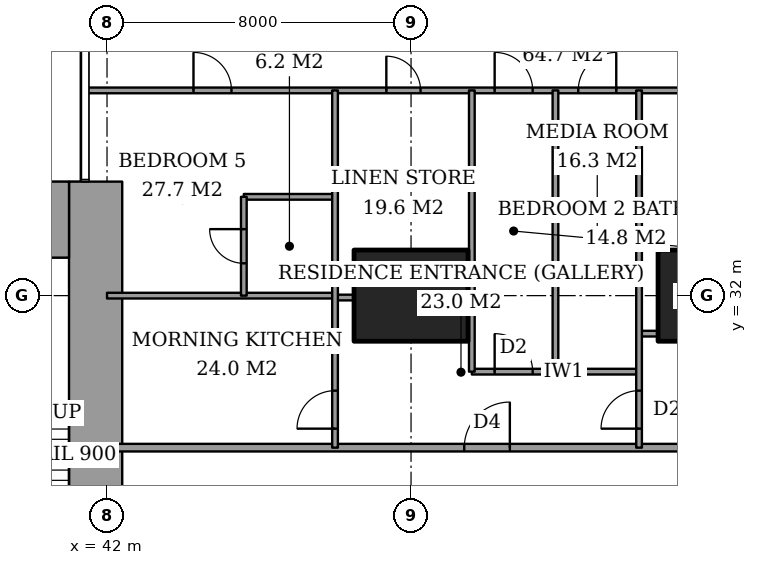
"""IFC4 building model, lengths in metres.
Left out: names, types, materials, properties, quantities, classifications, styles, units other than length and angle.
Written with IfcOpenShell. Run it as: python <this file> out.ifc"""

import sys

from ifc_helpers import new_model, si_unit, direction, frame, frame_2d, origin, origin_2d, place, context, subcontext, project, spatial, rectangle, extrude, element, fill, save


model = new_model("IFC4")
c1 = context("Model", 3, precision=1e-05, world=origin(), true_north=direction((0.0, 1.0)))
c2 = subcontext(c1, "Body", "Model", "MODEL_VIEW")
j1 = project(units=[si_unit("LENGTHUNIT", "METRE"), si_unit("PLANEANGLEUNIT", "RADIAN")], contexts=[c1])
p1 = place(None, origin())
s1 = spatial("IfcSite", under=j1, at=p1, CompositionType="ELEMENT")
p2 = place(p1, origin())
s2 = spatial("IfcBuilding", under=s1, at=p2, CompositionType="ELEMENT")
p3 = place(p2, frame((0.0, 0.0, 189.4)))
s3 = spatial("IfcBuildingStorey", under=s2, at=p3, CompositionType="ELEMENT", Elevation=189.4)
for number, where, z_axis, x_axis in (
    (1, (50.0, 32.0, 0.0), (0.0, 0.0, 1.0), (1.0, 0.0, 0.0)),
    (2, (58.0, 32.0, 0.0), (0.0, 0.0, 1.0), (1.0, 0.0, 0.0)),
):
    element("IfcColumn", number, at=place(p3, frame(where, z_axis=z_axis, x_axis=x_axis)), inside=s3, PredefinedType="COLUMN", context=c2, shape_type="SweptSolid", body=[
        extrude(rectangle(XDim=3.0, YDim=2.4, at=origin_2d()), origin(), (0.0, 0.0, 1.0), 3.6),
    ])
p4 = place(p3, frame((37.85, 34.0, 0.0), z_axis=(0.0, 0.0, 1.0), x_axis=(1.0, 0.0, 0.0)))
e3 = element("IfcWall", 3, at=p4, inside=s3, PredefinedType="SHEAR", context=c2, shape_type="SweptSolid", body=[
    extrude(rectangle(XDim=3.15, YDim=2.0, at=frame_2d((1.575, 0.0))), origin(), (0.0, 0.0, 1.0), 3.6),
])
p5 = place(p3, frame((41.7, 24.85, 0.0), z_axis=(0.0, 0.0, 1.0), x_axis=(0.0, 1.0, 0.0)))
e4 = element("IfcWall", 4, at=p5, inside=s3, PredefinedType="SHEAR", context=c2, shape_type="SweptSolid", body=[
    extrude(rectangle(XDim=10.15, YDim=1.4, at=frame_2d((5.075, 0.0))), origin(), (0.0, 0.0, 1.0), 3.6),
])
p6 = place(p3, frame((42.0, 28.0, 0.0), z_axis=(0.0, 0.0, 1.0), x_axis=(1.0, 0.0, 0.0)))
e5 = element("IfcWall", 5, at=p6, inside=s3, PredefinedType="PARTITIONING", context=c2, shape_type="SweptSolid", body=[
    extrude(rectangle(XDim=17.275, YDim=0.2, at=frame_2d((8.637, 0.0))), origin(), (0.0, 0.0, 1.0), 3.35),
])
p7 = place(p6, frame((9.4, 0.0, 0.0)))
e6 = element("IfcOpeningElement", 6, at=p7, cuts=e5, PredefinedType="OPENING", context=c2, shape_type="SweptSolid", body=[
    extrude(rectangle(XDim=1.2, YDim=2.4, at=frame_2d((0.6, 1.2))), frame((0.0, 0.11, 0.0), z_axis=(0.0, -1.0, 0.0), x_axis=(1.0, 0.0, 0.0)), (0.0, 0.0, 1.0), 0.22),
])
p8 = place(p3, frame((51.6, 30.0, 0.0), z_axis=(0.0, 0.0, 1.0), x_axis=(1.0, 0.0, 0.0)))
e7 = element("IfcWall", 7, at=p8, inside=s3, PredefinedType="PARTITIONING", context=c2, shape_type="SweptSolid", body=[
    extrude(rectangle(XDim=4.4, YDim=0.15, at=frame_2d((2.2, 0.0))), origin(), (0.0, 0.0, 1.0), 3.35),
])
p9 = place(p8, frame((0.6, 0.0, 0.0)))
e8 = element("IfcOpeningElement", 8, at=p9, cuts=e7, PredefinedType="OPENING", context=c2, shape_type="SweptSolid", body=[
    extrude(rectangle(XDim=1.0, YDim=2.1, at=frame_2d((0.5, 1.05))), frame((0.0, 0.085, 0.0), z_axis=(0.0, -1.0, 0.0), x_axis=(1.0, 0.0, 0.0)), (0.0, 0.0, 1.0), 0.17),
])
p10 = place(p3, frame((56.0, 31.0, 0.0), z_axis=(0.0, 0.0, 1.0), x_axis=(1.0, 0.0, 0.0)))
e9 = element("IfcWall", 9, at=p10, inside=s3, PredefinedType="PARTITIONING", context=c2, shape_type="SweptSolid", body=[
    extrude(rectangle(XDim=0.5, YDim=0.15, at=frame_2d((0.25, 0.0))), origin(), (0.0, 0.0, 1.0), 3.35),
])
p11 = place(p3, frame((48.0, 31.95, 0.0), z_axis=(0.0, 0.0, 1.0), x_axis=(1.0, 0.0, 0.0)))
e10 = element("IfcWall", 10, at=p11, inside=s3, PredefinedType="PARTITIONING", context=c2, shape_type="SweptSolid", body=[
    extrude(rectangle(XDim=0.5, YDim=0.15, at=frame_2d((0.25, 0.0))), origin(), (0.0, 0.0, 1.0), 2.634),
])
p12 = place(p3, frame((42.0, 32.0, 0.0), z_axis=(0.0, 0.0, 1.0), x_axis=(1.0, 0.0, 0.0)))
e11 = element("IfcWall", 11, at=p12, inside=s3, PredefinedType="PARTITIONING", context=c2, shape_type="SweptSolid", body=[
    extrude(rectangle(XDim=6.0, YDim=0.15, at=frame_2d((3.0, 0.0))), origin(), (0.0, 0.0, 1.0), 2.634),
])
p13 = place(p3, frame((45.6, 34.6, 0.0), z_axis=(0.0, 0.0, 1.0), x_axis=(1.0, 0.0, 0.0)))
e12 = element("IfcWall", 12, at=p13, inside=s3, PredefinedType="PARTITIONING", context=c2, shape_type="SweptSolid", body=[
    extrude(rectangle(XDim=2.4, YDim=0.15, at=frame_2d((1.2, 0.0))), origin(), (0.0, 0.0, 1.0), 3.35),
])
p14 = place(p3, frame((41.439, 37.4, 0.0), z_axis=(0.0, 0.0, 1.0), x_axis=(1.0, 0.0, 0.0)))
e13 = element("IfcWall", 13, at=p14, inside=s3, PredefinedType="PARTITIONING", context=c2, shape_type="SweptSolid", body=[
    extrude(rectangle(XDim=25.011, YDim=0.15, at=frame_2d((12.505, 0.0))), origin(), (0.0, 0.0, 1.0), 3.35),
])
p15 = place(p14, frame((10.761, 0.0, 0.0)))
e14 = element("IfcOpeningElement", 14, at=p15, cuts=e13, PredefinedType="OPENING", context=c2, shape_type="SweptSolid", body=[
    extrude(rectangle(XDim=1.0, YDim=2.1, at=frame_2d((0.5, 1.05))), frame((0.0, 0.085, 0.0), z_axis=(0.0, -1.0, 0.0), x_axis=(1.0, 0.0, 0.0)), (0.0, 0.0, 1.0), 0.17),
])
p16 = place(p14, frame((20.924, 0.0, 0.0)))
e15 = element("IfcOpeningElement", 15, at=p16, cuts=e13, PredefinedType="OPENING", context=c2, shape_type="SweptSolid", body=[
    extrude(rectangle(XDim=1.0, YDim=2.1, at=frame_2d((0.5, 1.05))), frame((0.0, 0.085, 0.0), z_axis=(0.0, -1.0, 0.0), x_axis=(1.0, 0.0, 0.0)), (0.0, 0.0, 1.0), 0.17),
])
p17 = place(p14, frame((15.749, 0.0, 0.0)))
e16 = element("IfcOpeningElement", 16, at=p17, cuts=e13, PredefinedType="OPENING", context=c2, shape_type="SweptSolid", body=[
    extrude(rectangle(XDim=0.9, YDim=2.1, at=frame_2d((0.45, 1.05))), frame((0.0, 0.085, 0.0), z_axis=(0.0, -1.0, 0.0), x_axis=(1.0, 0.0, 0.0)), (0.0, 0.0, 1.0), 0.17),
])
p18 = place(p14, frame((12.961, 0.0, 0.0)))
e17 = element("IfcOpeningElement", 17, at=p18, cuts=e13, PredefinedType="OPENING", context=c2, shape_type="SweptSolid", body=[
    extrude(rectangle(XDim=1.0, YDim=2.1, at=frame_2d((0.5, 1.05))), frame((0.0, 0.085, 0.0), z_axis=(0.0, -1.0, 0.0), x_axis=(1.0, 0.0, 0.0)), (0.0, 0.0, 1.0), 0.17),
])
p19 = place(p14, frame((7.911, 0.0, 0.0)))
e18 = element("IfcOpeningElement", 18, at=p19, cuts=e13, PredefinedType="OPENING", context=c2, shape_type="SweptSolid", body=[
    extrude(rectangle(XDim=0.9, YDim=2.1, at=frame_2d((0.45, 1.05))), frame((0.0, 0.085, 0.0), z_axis=(0.0, -1.0, 0.0), x_axis=(1.0, 0.0, 0.0)), (0.0, 0.0, 1.0), 0.17),
])
p20 = place(p14, frame((2.836, 0.0, 0.0)))
e19 = element("IfcOpeningElement", 19, at=p20, cuts=e13, PredefinedType="OPENING", context=c2, shape_type="SweptSolid", body=[
    extrude(rectangle(XDim=1.0, YDim=2.1, at=frame_2d((0.5, 1.05))), frame((0.0, 0.085, 0.0), z_axis=(0.0, -1.0, 0.0), x_axis=(1.0, 0.0, 0.0)), (0.0, 0.0, 1.0), 0.17),
])
p21 = place(p3, frame((45.6, 32.0, 0.0), z_axis=(0.0, 0.0, 1.0), x_axis=(0.0, 1.0, 0.0)))
e20 = element("IfcWall", 20, at=p21, inside=s3, PredefinedType="PARTITIONING", context=c2, shape_type="SweptSolid", body=[
    extrude(rectangle(XDim=2.6, YDim=0.15, at=frame_2d((1.3, 0.0))), origin(), (0.0, 0.0, 1.0), 3.35),
])
p22 = place(p21, frame((0.85, 0.0, 0.0)))
e21 = element("IfcOpeningElement", 21, at=p22, cuts=e20, PredefinedType="OPENING", context=c2, shape_type="SweptSolid", body=[
    extrude(rectangle(XDim=0.9, YDim=2.1, at=frame_2d((0.45, 1.05))), frame((0.0, 0.085, 0.0), z_axis=(0.0, -1.0, 0.0), x_axis=(1.0, 0.0, 0.0)), (0.0, 0.0, 1.0), 0.17),
])
p23 = place(p3, frame((48.0, 28.0, 0.0), z_axis=(0.0, 0.0, 1.0), x_axis=(0.0, 1.0, 0.0)))
e22 = element("IfcWall", 22, at=p23, inside=s3, PredefinedType="PARTITIONING", context=c2, shape_type="SweptSolid", body=[
    extrude(rectangle(XDim=9.4, YDim=0.15, at=frame_2d((4.7, 0.0))), origin(), (0.0, 0.0, 1.0), 3.35),
])
p24 = place(p23, frame((0.5, 0.0, 0.0)))
e23 = element("IfcOpeningElement", 23, at=p24, cuts=e22, PredefinedType="OPENING", context=c2, shape_type="SweptSolid", body=[
    extrude(rectangle(XDim=1.0, YDim=2.1, at=frame_2d((0.5, 1.05))), frame((0.0, 0.085, 0.0), z_axis=(0.0, -1.0, 0.0), x_axis=(1.0, 0.0, 0.0)), (0.0, 0.0, 1.0), 0.17),
])
for number, where, z_axis, x_axis in (
    (24, (51.6, 30.0, 0.0), (0.0, 0.0, 1.0), (0.0, 1.0, 0.0)),
    (25, (53.8, 30.0, 0.0), (0.0, 0.0, 1.0), (0.0, 1.0, 0.0)),
):
    element("IfcWall", number, at=place(p3, frame(where, z_axis=z_axis, x_axis=x_axis)), inside=s3, PredefinedType="PARTITIONING", context=c2, shape_type="SweptSolid", body=[
        extrude(rectangle(XDim=7.4, YDim=0.15, at=frame_2d((3.7, 0.0))), origin(), (0.0, 0.0, 1.0), 3.35),
    ])
p25 = place(p3, frame((56.0, 28.0, 0.0), z_axis=(0.0, 0.0, 1.0), x_axis=(0.0, 1.0, 0.0)))
e26 = element("IfcWall", 26, at=p25, inside=s3, PredefinedType="PARTITIONING", context=c2, shape_type="SweptSolid", body=[
    extrude(rectangle(XDim=9.4, YDim=0.15, at=frame_2d((4.7, 0.0))), origin(), (0.0, 0.0, 1.0), 3.35),
])
p26 = place(p25, frame((0.5, 0.0, 0.0)))
e27 = element("IfcOpeningElement", 27, at=p26, cuts=e26, PredefinedType="OPENING", context=c2, shape_type="SweptSolid", body=[
    extrude(rectangle(XDim=1.0, YDim=2.1, at=frame_2d((0.5, 1.05))), frame((0.0, 0.085, 0.0), z_axis=(0.0, -1.0, 0.0), x_axis=(1.0, 0.0, 0.0)), (0.0, 0.0, 1.0), 0.17),
])
p27 = place(p15, origin())
e28 = element("IfcDoor", 28, at=p27, inside=s3, OperationType="SINGLE_SWING_RIGHT", PredefinedType="DOOR", context=c2, shape_type="SweptSolid", body=[
    extrude(rectangle(XDim=1.0, YDim=2.1, at=frame_2d((0.5, 1.05))), frame((0.0, 0.025, 0.0), z_axis=(0.0, -1.0, 0.0), x_axis=(1.0, 0.0, 0.0)), (0.0, 0.0, 1.0), 0.05),
])
fill(e14, e28)
p28 = place(p26, origin())
e29 = element("IfcDoor", 29, at=p28, inside=s3, OperationType="SINGLE_SWING_RIGHT", PredefinedType="DOOR", context=c2, shape_type="SweptSolid", body=[
    extrude(rectangle(XDim=1.0, YDim=2.1, at=frame_2d((0.5, 1.05))), frame((0.0, 0.025, 0.0), z_axis=(0.0, -1.0, 0.0), x_axis=(1.0, 0.0, 0.0)), (0.0, 0.0, 1.0), 0.05),
])
fill(e27, e29)
p29 = place(p7, origin())
e30 = element("IfcDoor", 30, at=p29, inside=s3, OperationType="SINGLE_SWING_LEFT", PredefinedType="DOOR", context=c2, shape_type="SweptSolid", body=[
    extrude(rectangle(XDim=1.2, YDim=2.4, at=frame_2d((0.6, 1.2))), frame((0.0, 0.025, 0.0), z_axis=(0.0, -1.0, 0.0), x_axis=(1.0, 0.0, 0.0)), (0.0, 0.0, 1.0), 0.05),
])
fill(e6, e30)
p30 = place(p18, origin())
e31 = element("IfcDoor", 31, at=p30, inside=s3, OperationType="SINGLE_SWING_LEFT", PredefinedType="DOOR", context=c2, shape_type="SweptSolid", body=[
    extrude(rectangle(XDim=1.0, YDim=2.1, at=frame_2d((0.5, 1.05))), frame((0.0, 0.025, 0.0), z_axis=(0.0, -1.0, 0.0), x_axis=(1.0, 0.0, 0.0)), (0.0, 0.0, 1.0), 0.05),
])
fill(e17, e31)
p31 = place(p9, origin())
e32 = element("IfcDoor", 32, at=p31, inside=s3, OperationType="SINGLE_SWING_RIGHT", PredefinedType="DOOR", context=c2, shape_type="SweptSolid", body=[
    extrude(rectangle(XDim=1.0, YDim=2.1, at=frame_2d((0.5, 1.05))), frame((0.0, 0.025, 0.0), z_axis=(0.0, -1.0, 0.0), x_axis=(1.0, 0.0, 0.0)), (0.0, 0.0, 1.0), 0.05),
])
fill(e8, e32)
p32 = place(p19, origin())
e33 = element("IfcDoor", 33, at=p32, inside=s3, OperationType="SINGLE_SWING_RIGHT", PredefinedType="DOOR", context=c2, shape_type="SweptSolid", body=[
    extrude(rectangle(XDim=0.9, YDim=2.1, at=frame_2d((0.45, 1.05))), frame((0.0, 0.025, 0.0), z_axis=(0.0, -1.0, 0.0), x_axis=(1.0, 0.0, 0.0)), (0.0, 0.0, 1.0), 0.05),
])
fill(e18, e33)
p33 = place(p22, origin())
e34 = element("IfcDoor", 34, at=p33, inside=s3, OperationType="SINGLE_SWING_LEFT", PredefinedType="DOOR", context=c2, shape_type="SweptSolid", body=[
    extrude(rectangle(XDim=0.9, YDim=2.1, at=frame_2d((0.45, 1.05))), frame((0.0, 0.025, 0.0), z_axis=(0.0, -1.0, 0.0), x_axis=(1.0, 0.0, 0.0)), (0.0, 0.0, 1.0), 0.05),
])
fill(e21, e34)
p34 = place(p20, origin())
e35 = element("IfcDoor", 35, at=p34, inside=s3, OperationType="SINGLE_SWING_RIGHT", PredefinedType="DOOR", context=c2, shape_type="SweptSolid", body=[
    extrude(rectangle(XDim=1.0, YDim=2.1, at=frame_2d((0.5, 1.05))), frame((0.0, 0.025, 0.0), z_axis=(0.0, -1.0, 0.0), x_axis=(1.0, 0.0, 0.0)), (0.0, 0.0, 1.0), 0.05),
])
fill(e19, e35)
p35 = place(p24, origin())
e36 = element("IfcDoor", 36, at=p35, inside=s3, OperationType="SINGLE_SWING_RIGHT", PredefinedType="DOOR", context=c2, shape_type="SweptSolid", body=[
    extrude(rectangle(XDim=1.0, YDim=2.1, at=frame_2d((0.5, 1.05))), frame((0.0, 0.025, 0.0), z_axis=(0.0, -1.0, 0.0), x_axis=(1.0, 0.0, 0.0)), (0.0, 0.0, 1.0), 0.05),
])
fill(e23, e36)
save(model, sys.argv[1])
